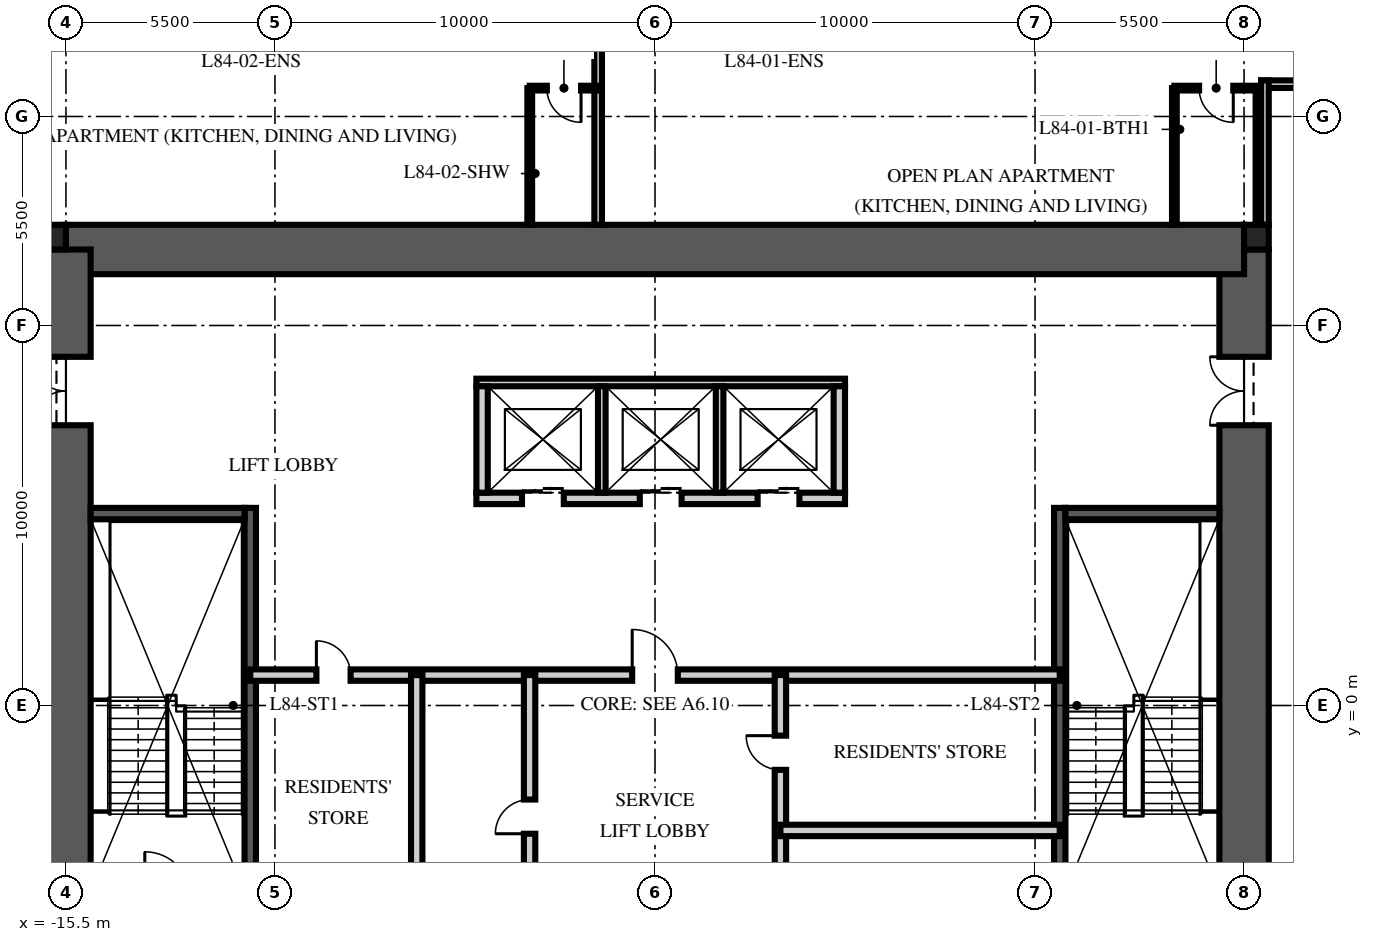
"""IFC4 building model, lengths in metres.
Left out: names, types, materials, properties, quantities, classifications, styles, units other than length and angle.
Written with IfcOpenShell. Run it as: python <this file> out.ifc"""

import sys

from ifc_helpers import new_model, si_unit, direction, frame, frame_2d, origin, origin_2d, place, context, subcontext, project, spatial, rectangle, extrude, element, fill, save


model = new_model("IFC4")
c1 = context("Model", 3, precision=1e-05, world=origin(), true_north=direction((0.0, 1.0)))
c2 = subcontext(c1, "Body", "Model", "MODEL_VIEW")
j1 = project(units=[si_unit("LENGTHUNIT", "METRE"), si_unit("PLANEANGLEUNIT", "RADIAN")], contexts=[c1])
p1 = place(None, origin())
s1 = spatial("IfcSite", under=j1, at=p1, CompositionType="ELEMENT")
p2 = place(p1, origin())
s2 = spatial("IfcBuilding", under=s1, at=p2, CompositionType="ELEMENT")
p3 = place(p2, frame((0.0, 0.0, 334.5)))
s3 = spatial("IfcBuildingStorey", under=s2, at=p3, CompositionType="ELEMENT", Elevation=334.5)
p4 = place(p3, frame((15.5, -12.0, -0.25), z_axis=(0.0, 0.0, 1.0), x_axis=(0.0, 1.0, 0.0)))
e1 = element("IfcWall", 1, at=p4, inside=s3, PredefinedType="SHEAR", context=c2, shape_type="SweptSolid", body=[
    extrude(rectangle(XDim=24.0, YDim=1.3, at=frame_2d((12.0, 0.0))), origin(), (0.0, 0.0, 1.0), 3.75),
])
p5 = place(p4, frame((3.125, 0.0, 0.25)))
e2 = element("IfcOpeningElement", 2, at=p5, cuts=e1, PredefinedType="OPENING", context=c2, shape_type="SweptSolid", body=[
    extrude(rectangle(XDim=1.2, YDim=2.1, at=frame_2d((0.6, 1.05))), frame((0.0, 0.66, 0.0), z_axis=(0.0, -1.0, 0.0), x_axis=(1.0, 0.0, 0.0)), (0.0, 0.0, 1.0), 1.32),
])
p6 = place(p4, frame((19.375, 0.0, 0.25)))
e3 = element("IfcOpeningElement", 3, at=p6, cuts=e1, PredefinedType="OPENING", context=c2, shape_type="SweptSolid", body=[
    extrude(rectangle(XDim=1.8, YDim=2.1, at=frame_2d((0.9, 1.05))), frame((0.0, 0.66, 0.0), z_axis=(0.0, -1.0, 0.0), x_axis=(1.0, 0.0, 0.0)), (0.0, 0.0, 1.0), 1.32),
])
p7 = place(p3, frame((-15.5, 12.0, -0.25), z_axis=(0.0, 0.0, 1.0), x_axis=(1.0, 0.0, 0.0)))
e4 = element("IfcWall", 4, at=p7, inside=s3, PredefinedType="SHEAR", context=c2, shape_type="SweptSolid", body=[
    extrude(rectangle(XDim=31.0, YDim=1.3, at=frame_2d((15.5, 0.0))), origin(), (0.0, 0.0, 1.0), 3.75),
])
p8 = place(p3, frame((-15.5, -12.0, -0.25), z_axis=(0.0, 0.0, 1.0), x_axis=(0.0, 1.0, 0.0)))
e5 = element("IfcWall", 5, at=p8, inside=s3, PredefinedType="SHEAR", context=c2, shape_type="SweptSolid", body=[
    extrude(rectangle(XDim=24.0, YDim=1.3, at=frame_2d((12.0, 0.0))), origin(), (0.0, 0.0, 1.0), 3.75),
])
p9 = place(p8, frame((3.125, 0.0, 0.25)))
e6 = element("IfcOpeningElement", 6, at=p9, cuts=e5, PredefinedType="OPENING", context=c2, shape_type="SweptSolid", body=[
    extrude(rectangle(XDim=1.2, YDim=2.1, at=frame_2d((0.6, 1.05))), frame((0.0, 0.66, 0.0), z_axis=(0.0, -1.0, 0.0), x_axis=(1.0, 0.0, 0.0)), (0.0, 0.0, 1.0), 1.32),
])
p10 = place(p8, frame((19.375, 0.0, 0.25)))
e7 = element("IfcOpeningElement", 7, at=p10, cuts=e5, PredefinedType="OPENING", context=c2, shape_type="SweptSolid", body=[
    extrude(rectangle(XDim=1.8, YDim=2.1, at=frame_2d((0.9, 1.05))), frame((0.0, 0.66, 0.0), z_axis=(0.0, -1.0, 0.0), x_axis=(1.0, 0.0, 0.0)), (0.0, 0.0, 1.0), 1.32),
])
for number, where, z_axis, x_axis in (
    (8, (15.825, 12.325, -0.25), (0.0, 0.0, 1.0), (1.0, 0.0, 0.0)),
    (9, (-15.825, 12.325, -0.25), (0.0, 0.0, 1.0), (1.0, 0.0, 0.0)),
):
    element("IfcColumn", number, at=place(p3, frame(where, z_axis=z_axis, x_axis=x_axis)), inside=s3, PredefinedType="COLUMN", context=c2, shape_type="SweptSolid", body=[
        extrude(rectangle(XDim=0.65, YDim=0.65, at=origin_2d()), origin(), (0.0, 0.0, 1.0), 3.75),
    ])
p11 = place(p3, frame((-10.65, -4.9, 0.0), z_axis=(0.0, 0.0, 1.0), x_axis=(0.0, 1.0, 0.0)))
e10 = element("IfcWall", 10, at=p11, inside=s3, PredefinedType="SOLIDWALL", context=c2, shape_type="SweptSolid", body=[
    extrude(rectangle(XDim=10.1, YDim=0.3, at=frame_2d((5.05, 0.0))), origin(), (0.0, 0.0, 1.0), 3.5),
])
p12 = place(p3, frame((-14.85, 5.05, 0.0), z_axis=(0.0, 0.0, 1.0), x_axis=(1.0, 0.0, 0.0)))
e11 = element("IfcWall", 11, at=p12, inside=s3, PredefinedType="SOLIDWALL", context=c2, shape_type="SweptSolid", body=[
    extrude(rectangle(XDim=4.05, YDim=0.3, at=frame_2d((2.025, 0.0))), origin(), (0.0, 0.0, 1.0), 3.5),
])
p13 = place(p3, frame((10.65, -4.9, 0.0), z_axis=(0.0, 0.0, 1.0), x_axis=(0.0, 1.0, 0.0)))
e12 = element("IfcWall", 12, at=p13, inside=s3, PredefinedType="SOLIDWALL", context=c2, shape_type="SweptSolid", body=[
    extrude(rectangle(XDim=10.1, YDim=0.3, at=frame_2d((5.05, 0.0))), origin(), (0.0, 0.0, 1.0), 3.5),
])
p14 = place(p3, frame((14.85, 5.05, 0.0), z_axis=(0.0, 0.0, 1.0), x_axis=(-1.0, 0.0, 0.0)))
e13 = element("IfcWall", 13, at=p14, inside=s3, PredefinedType="SOLIDWALL", context=c2, shape_type="SweptSolid", body=[
    extrude(rectangle(XDim=4.05, YDim=0.3, at=frame_2d((2.025, 0.0))), origin(), (0.0, 0.0, 1.0), 3.5),
])
p15 = place(p3, frame((-4.7, 5.45, 0.0), z_axis=(0.0, 0.0, 1.0), x_axis=(1.0, 0.0, 0.0)))
e14 = element("IfcWall", 14, at=p15, inside=s3, PredefinedType="PARTITIONING", context=c2, shape_type="SweptSolid", body=[
    extrude(rectangle(XDim=9.7, YDim=0.3, at=frame_2d((4.85, 0.0))), origin(), (0.0, 0.0, 1.0), 3.5),
])
p16 = place(p15, frame((1.2, 0.0, 0.0)))
e15 = element("IfcOpeningElement", 15, at=p16, cuts=e14, PredefinedType="OPENING", context=c2, shape_type="SweptSolid", body=[
    extrude(rectangle(XDim=1.1, YDim=2.1, at=frame_2d((0.55, 1.05))), frame((0.0, 0.16, 0.0), z_axis=(0.0, -1.0, 0.0), x_axis=(1.0, 0.0, 0.0)), (0.0, 0.0, 1.0), 0.32),
])
p17 = place(p15, frame((4.3, 0.0, 0.0)))
e16 = element("IfcOpeningElement", 16, at=p17, cuts=e14, PredefinedType="OPENING", context=c2, shape_type="SweptSolid", body=[
    extrude(rectangle(XDim=1.1, YDim=2.1, at=frame_2d((0.55, 1.05))), frame((0.0, 0.16, 0.0), z_axis=(0.0, -1.0, 0.0), x_axis=(1.0, 0.0, 0.0)), (0.0, 0.0, 1.0), 0.32),
])
p18 = place(p15, frame((7.4, 0.0, 0.0)))
e17 = element("IfcOpeningElement", 17, at=p18, cuts=e14, PredefinedType="OPENING", context=c2, shape_type="SweptSolid", body=[
    extrude(rectangle(XDim=1.1, YDim=2.1, at=frame_2d((0.55, 1.05))), frame((0.0, 0.16, 0.0), z_axis=(0.0, -1.0, 0.0), x_axis=(1.0, 0.0, 0.0)), (0.0, 0.0, 1.0), 0.32),
])
p19 = place(p3, frame((-4.7, 8.5, 0.0), z_axis=(0.0, 0.0, 1.0), x_axis=(1.0, 0.0, 0.0)))
e18 = element("IfcWall", 18, at=p19, inside=s3, PredefinedType="PARTITIONING", context=c2, shape_type="SweptSolid", body=[
    extrude(rectangle(XDim=9.7, YDim=0.2, at=frame_2d((4.85, 0.0))), origin(), (0.0, 0.0, 1.0), 3.5),
])
for number, where, z_axis, x_axis in (
    (19, (-4.55, 5.6, 0.0), (0.0, 0.0, 1.0), (0.0, 1.0, 0.0)),
    (20, (4.85, 5.6, 0.0), (0.0, 0.0, 1.0), (0.0, 1.0, 0.0)),
):
    element("IfcWall", number, at=place(p3, frame(where, z_axis=z_axis, x_axis=x_axis)), inside=s3, PredefinedType="PARTITIONING", context=c2, shape_type="SweptSolid", body=[
        extrude(rectangle(XDim=2.8, YDim=0.3, at=frame_2d((1.4, 0.0))), origin(), (0.0, 0.0, 1.0), 3.5),
    ])
for number, where, z_axis, x_axis in (
    (21, (-1.4, 5.6, 0.0), (0.0, 0.0, 1.0), (0.0, 1.0, 0.0)),
    (22, (1.7, 5.6, 0.0), (0.0, 0.0, 1.0), (0.0, 1.0, 0.0)),
):
    element("IfcWall", number, at=place(p3, frame(where, z_axis=z_axis, x_axis=x_axis)), inside=s3, PredefinedType="PARTITIONING", context=c2, shape_type="SweptSolid", body=[
        extrude(rectangle(XDim=2.8, YDim=0.2, at=frame_2d((1.4, 0.0))), origin(), (0.0, 0.0, 1.0), 3.5),
    ])
p20 = place(p3, frame((-10.65, 0.8, 0.0), z_axis=(0.0, 0.0, 1.0), x_axis=(1.0, 0.0, 0.0)))
e23 = element("IfcWall", 23, at=p20, inside=s3, PredefinedType="PARTITIONING", context=c2, shape_type="SweptSolid", body=[
    extrude(rectangle(XDim=21.3, YDim=0.3, at=frame_2d((10.65, 0.0))), origin(), (0.0, 0.0, 1.0), 3.5),
])
p21 = place(p20, frame((10.05, 0.0, 0.0)))
e24 = element("IfcOpeningElement", 24, at=p21, cuts=e23, PredefinedType="OPENING", context=c2, shape_type="SweptSolid", body=[
    extrude(rectangle(XDim=1.2, YDim=2.1, at=frame_2d((0.6, 1.05))), frame((0.0, 0.16, 0.0), z_axis=(0.0, -1.0, 0.0), x_axis=(1.0, 0.0, 0.0)), (0.0, 0.0, 1.0), 0.32),
])
p22 = place(p20, frame((1.74, 0.0, 0.0)))
e25 = element("IfcOpeningElement", 25, at=p22, cuts=e23, PredefinedType="OPENING", context=c2, shape_type="SweptSolid", body=[
    extrude(rectangle(XDim=0.9, YDim=2.1, at=frame_2d((0.45, 1.05))), frame((0.0, 0.16, 0.0), z_axis=(0.0, -1.0, 0.0), x_axis=(1.0, 0.0, 0.0)), (0.0, 0.0, 1.0), 0.32),
])
p23 = place(p3, frame((-3.3, -6.65, 0.0), z_axis=(0.0, 0.0, 1.0), x_axis=(0.0, 1.0, 0.0)))
e26 = element("IfcWall", 26, at=p23, inside=s3, PredefinedType="PARTITIONING", context=c2, shape_type="SweptSolid", body=[
    extrude(rectangle(XDim=7.45, YDim=0.3, at=frame_2d((3.725, 0.0))), origin(), (0.0, 0.0, 1.0), 3.5),
])
p24 = place(p23, frame((3.275, 0.0, 0.0)))
e27 = element("IfcOpeningElement", 27, at=p24, cuts=e26, PredefinedType="OPENING", context=c2, shape_type="SweptSolid", body=[
    extrude(rectangle(XDim=0.9, YDim=2.1, at=frame_2d((0.45, 1.05))), frame((0.0, 0.16, 0.0), z_axis=(0.0, -1.0, 0.0), x_axis=(1.0, 0.0, 0.0)), (0.0, 0.0, 1.0), 0.32),
])
p25 = place(p3, frame((3.3, -6.65, 0.0), z_axis=(0.0, 0.0, 1.0), x_axis=(0.0, 1.0, 0.0)))
e28 = element("IfcWall", 28, at=p25, inside=s3, PredefinedType="PARTITIONING", context=c2, shape_type="SweptSolid", body=[
    extrude(rectangle(XDim=7.45, YDim=0.3, at=frame_2d((3.725, 0.0))), origin(), (0.0, 0.0, 1.0), 3.5),
])
p26 = place(p25, frame((1.231, 0.0, 0.0)))
e29 = element("IfcOpeningElement", 29, at=p26, cuts=e28, PredefinedType="OPENING", context=c2, shape_type="SweptSolid", body=[
    extrude(rectangle(XDim=0.9, YDim=2.1, at=frame_2d((0.45, 1.05))), frame((0.0, 0.16, 0.0), z_axis=(0.0, -1.0, 0.0), x_axis=(1.0, 0.0, 0.0)), (0.0, 0.0, 1.0), 0.32),
])
p27 = place(p25, frame((4.956, 0.0, 0.0)))
e30 = element("IfcOpeningElement", 30, at=p27, cuts=e28, PredefinedType="OPENING", context=c2, shape_type="SweptSolid", body=[
    extrude(rectangle(XDim=0.9, YDim=2.1, at=frame_2d((0.45, 1.05))), frame((0.0, 0.16, 0.0), z_axis=(0.0, -1.0, 0.0), x_axis=(1.0, 0.0, 0.0)), (0.0, 0.0, 1.0), 0.32),
])
p28 = place(p3, frame((-6.27, -6.65, 0.0), z_axis=(0.0, 0.0, 1.0), x_axis=(0.0, 1.0, 0.0)))
e31 = element("IfcWall", 31, at=p28, inside=s3, PredefinedType="PARTITIONING", context=c2, shape_type="SweptSolid", body=[
    extrude(rectangle(XDim=7.45, YDim=0.3, at=frame_2d((3.725, 0.0))), origin(), (0.0, 0.0, 1.0), 3.5),
])
p29 = place(p3, frame((10.65, -3.288, 0.0), z_axis=(0.0, 0.0, 1.0), x_axis=(-1.0, 0.0, 0.0)))
e32 = element("IfcWall", 32, at=p29, inside=s3, PredefinedType="PARTITIONING", context=c2, shape_type="SweptSolid", body=[
    extrude(rectangle(XDim=7.35, YDim=0.3, at=frame_2d((3.675, 0.0))), origin(), (0.0, 0.0, 1.0), 3.5),
])
p30 = place(p3, frame((19.15, 16.35, 0.0), z_axis=(0.0, 0.0, 1.0), x_axis=(-1.0, 0.0, 0.0)))
e33 = element("IfcWall", 33, at=p30, inside=s3, PredefinedType="PARTITIONING", context=c2, shape_type="SweptSolid", body=[
    extrude(rectangle(XDim=3.2, YDim=0.2, at=frame_2d((1.6, 0.0))), origin(), (0.0, 0.0, 1.0), 2.6),
])
p31 = place(p3, frame((16.05, 16.45, 0.0), z_axis=(0.0, 0.0, 1.0), x_axis=(0.0, -1.0, 0.0)))
e34 = element("IfcWall", 34, at=p31, inside=s3, PredefinedType="PARTITIONING", context=c2, shape_type="SweptSolid", body=[
    extrude(rectangle(XDim=3.8, YDim=0.2, at=frame_2d((1.9, 0.0))), origin(), (0.0, 0.0, 1.0), 2.6),
])
p32 = place(p3, frame((-1.496, 12.65, 0.0), z_axis=(0.0, 0.0, 1.0), x_axis=(0.0, 1.0, 0.0)))
e35 = element("IfcWall", 35, at=p32, inside=s3, PredefinedType="PARTITIONING", context=c2, shape_type="SweptSolid", body=[
    extrude(rectangle(XDim=10.35, YDim=0.2, at=frame_2d((5.175, 0.0))), origin(), (0.0, 0.0, 1.0), 3.01),
])
p33 = place(p3, frame((15.866, 16.246, 0.0), z_axis=(0.0, 0.0, 1.0), x_axis=(-1.0, 0.0, 0.0)))
e36 = element("IfcWall", 36, at=p33, inside=s3, PredefinedType="PARTITIONING", context=c2, shape_type="SweptSolid", body=[
    extrude(rectangle(XDim=2.2, YDim=0.125, at=frame_2d((1.1, 0.0))), origin(), (0.0, 0.0, 1.0), 2.9),
])
p34 = place(p33, frame((0.65, 0.0, 0.0)))
e37 = element("IfcOpeningElement", 37, at=p34, cuts=e36, PredefinedType="OPENING", context=c2, shape_type="SweptSolid", body=[
    extrude(rectangle(XDim=0.9, YDim=2.1, at=frame_2d((0.45, 1.05))), frame((0.0, 0.073, 0.0), z_axis=(0.0, -1.0, 0.0), x_axis=(1.0, 0.0, 0.0)), (0.0, 0.0, 1.0), 0.145),
])
p35 = place(p3, frame((15.866, 12.65, 0.0), z_axis=(0.0, 0.0, 1.0), x_axis=(0.0, 1.0, 0.0)))
e38 = element("IfcWall", 38, at=p35, inside=s3, PredefinedType="PARTITIONING", context=c2, shape_type="SweptSolid", body=[
    extrude(rectangle(XDim=3.596, YDim=0.125, at=frame_2d((1.798, 0.0))), origin(), (0.0, 0.0, 1.0), 2.6),
])
p36 = place(p3, frame((13.667, 12.65, 0.0), z_axis=(0.0, 0.0, 1.0), x_axis=(0.0, 1.0, 0.0)))
e39 = element("IfcWall", 39, at=p36, inside=s3, PredefinedType="PARTITIONING", context=c2, shape_type="SweptSolid", body=[
    extrude(rectangle(XDim=3.596, YDim=0.125, at=frame_2d((1.798, 0.0))), origin(), (0.0, 0.0, 1.0), 3.5),
])
p37 = place(p3, frame((-1.496, 16.246, 0.0), z_axis=(0.0, 0.0, 1.0), x_axis=(-1.0, 0.0, 0.0)))
e40 = element("IfcWall", 40, at=p37, inside=s3, PredefinedType="PARTITIONING", context=c2, shape_type="SweptSolid", body=[
    extrude(rectangle(XDim=1.8, YDim=0.125, at=frame_2d((0.9, 0.0))), origin(), (0.0, 0.0, 1.0), 3.5),
])
p38 = place(p37, frame((0.45, 0.0, 0.0)))
e41 = element("IfcOpeningElement", 41, at=p38, cuts=e40, PredefinedType="OPENING", context=c2, shape_type="SweptSolid", body=[
    extrude(rectangle(XDim=0.9, YDim=2.1, at=frame_2d((0.45, 1.05))), frame((0.0, 0.073, 0.0), z_axis=(0.0, -1.0, 0.0), x_axis=(1.0, 0.0, 0.0)), (0.0, 0.0, 1.0), 0.145),
])
p39 = place(p3, frame((-3.296, 12.65, 0.0), z_axis=(0.0, 0.0, 1.0), x_axis=(0.0, 1.0, 0.0)))
e42 = element("IfcWall", 42, at=p39, inside=s3, PredefinedType="PARTITIONING", context=c2, shape_type="SweptSolid", body=[
    extrude(rectangle(XDim=3.596, YDim=0.125, at=frame_2d((1.798, 0.0))), origin(), (0.0, 0.0, 1.0), 3.5),
])
p40 = place(p10, origin())
e43 = element("IfcDoor", 43, at=p40, inside=s3, OperationType="DOUBLE_DOOR_SINGLE_SWING", PredefinedType="DOOR", context=c2, shape_type="SweptSolid", body=[
    extrude(rectangle(XDim=1.8, YDim=2.1, at=frame_2d((0.9, 1.05))), frame((0.0, 0.025, 0.0), z_axis=(0.0, -1.0, 0.0), x_axis=(1.0, 0.0, 0.0)), (0.0, 0.0, 1.0), 0.05),
])
fill(e7, e43)
p41 = place(p6, origin())
e44 = element("IfcDoor", 44, at=p41, inside=s3, OperationType="DOUBLE_DOOR_SINGLE_SWING", PredefinedType="DOOR", context=c2, shape_type="SweptSolid", body=[
    extrude(rectangle(XDim=1.8, YDim=2.1, at=frame_2d((0.9, 1.05))), frame((0.0, 0.025, 0.0), z_axis=(0.0, -1.0, 0.0), x_axis=(1.0, 0.0, 0.0)), (0.0, 0.0, 1.0), 0.05),
])
fill(e3, e44)
p42 = place(p16, origin())
e45 = element("IfcDoor", 45, at=p42, inside=s3, OperationType="DOUBLE_DOOR_SLIDING", PredefinedType="DOOR", context=c2, shape_type="SweptSolid", body=[
    extrude(rectangle(XDim=1.1, YDim=2.1, at=frame_2d((0.55, 1.05))), frame((0.0, 0.025, 0.0), z_axis=(0.0, -1.0, 0.0), x_axis=(1.0, 0.0, 0.0)), (0.0, 0.0, 1.0), 0.05),
])
fill(e15, e45)
p43 = place(p17, origin())
e46 = element("IfcDoor", 46, at=p43, inside=s3, OperationType="DOUBLE_DOOR_SLIDING", PredefinedType="DOOR", context=c2, shape_type="SweptSolid", body=[
    extrude(rectangle(XDim=1.1, YDim=2.1, at=frame_2d((0.55, 1.05))), frame((0.0, 0.025, 0.0), z_axis=(0.0, -1.0, 0.0), x_axis=(1.0, 0.0, 0.0)), (0.0, 0.0, 1.0), 0.05),
])
fill(e16, e46)
p44 = place(p18, origin())
e47 = element("IfcDoor", 47, at=p44, inside=s3, OperationType="DOUBLE_DOOR_SLIDING", PredefinedType="DOOR", context=c2, shape_type="SweptSolid", body=[
    extrude(rectangle(XDim=1.1, YDim=2.1, at=frame_2d((0.55, 1.05))), frame((0.0, 0.025, 0.0), z_axis=(0.0, -1.0, 0.0), x_axis=(1.0, 0.0, 0.0)), (0.0, 0.0, 1.0), 0.05),
])
fill(e17, e47)
p45 = place(p21, origin())
e48 = element("IfcDoor", 48, at=p45, inside=s3, OperationType="SINGLE_SWING_LEFT", PredefinedType="DOOR", context=c2, shape_type="SweptSolid", body=[
    extrude(rectangle(XDim=1.2, YDim=2.1, at=frame_2d((0.6, 1.05))), frame((0.0, 0.025, 0.0), z_axis=(0.0, -1.0, 0.0), x_axis=(1.0, 0.0, 0.0)), (0.0, 0.0, 1.0), 0.05),
])
fill(e24, e48)
p46 = place(p24, origin())
e49 = element("IfcDoor", 49, at=p46, inside=s3, OperationType="SINGLE_SWING_LEFT", PredefinedType="DOOR", context=c2, shape_type="SweptSolid", body=[
    extrude(rectangle(XDim=0.9, YDim=2.1, at=frame_2d((0.45, 1.05))), frame((0.0, 0.025, 0.0), z_axis=(0.0, -1.0, 0.0), x_axis=(1.0, 0.0, 0.0)), (0.0, 0.0, 1.0), 0.05),
])
fill(e27, e49)
p47 = place(p22, origin())
e50 = element("IfcDoor", 50, at=p47, inside=s3, OperationType="SINGLE_SWING_LEFT", PredefinedType="DOOR", context=c2, shape_type="SweptSolid", body=[
    extrude(rectangle(XDim=0.9, YDim=2.1, at=frame_2d((0.45, 1.05))), frame((0.0, 0.025, 0.0), z_axis=(0.0, -1.0, 0.0), x_axis=(1.0, 0.0, 0.0)), (0.0, 0.0, 1.0), 0.05),
])
fill(e25, e50)
p48 = place(p27, origin())
e51 = element("IfcDoor", 51, at=p48, inside=s3, OperationType="SINGLE_SWING_RIGHT", PredefinedType="DOOR", context=c2, shape_type="SweptSolid", body=[
    extrude(rectangle(XDim=0.9, YDim=2.1, at=frame_2d((0.45, 1.05))), frame((0.0, 0.025, 0.0), z_axis=(0.0, -1.0, 0.0), x_axis=(1.0, 0.0, 0.0)), (0.0, 0.0, 1.0), 0.05),
])
fill(e30, e51)
p49 = place(p34, origin())
e52 = element("IfcDoor", 52, at=p49, inside=s3, OperationType="SINGLE_SWING_LEFT", PredefinedType="DOOR", context=c2, shape_type="SweptSolid", body=[
    extrude(rectangle(XDim=0.9, YDim=2.1, at=frame_2d((0.45, 1.05))), frame((0.0, 0.025, 0.0), z_axis=(0.0, -1.0, 0.0), x_axis=(1.0, 0.0, 0.0)), (0.0, 0.0, 1.0), 0.05),
])
fill(e37, e52)
p50 = place(p38, origin())
e53 = element("IfcDoor", 53, at=p50, inside=s3, OperationType="SINGLE_SWING_LEFT", PredefinedType="DOOR", context=c2, shape_type="SweptSolid", body=[
    extrude(rectangle(XDim=0.9, YDim=2.1, at=frame_2d((0.45, 1.05))), frame((0.0, 0.025, 0.0), z_axis=(0.0, -1.0, 0.0), x_axis=(1.0, 0.0, 0.0)), (0.0, 0.0, 1.0), 0.05),
])
fill(e41, e53)
save(model, sys.argv[1])
